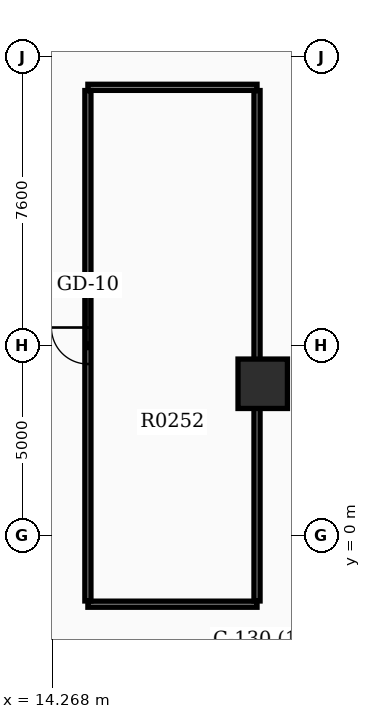
"""IFC4 building model, lengths in metres.
Left out: names, types, materials, properties, quantities, classifications, styles, units other than length and angle.
Written with IfcOpenShell. Run it as: python <this file> out.ifc"""

import sys

from ifc_helpers import new_model, si_unit, direction, frame, frame_2d, origin, origin_2d, place, context, subcontext, project, spatial, rectangle, extrude, element, fill, save


model = new_model("IFC4")
c1 = context("Model", 3, precision=1e-05, world=origin(), true_north=direction((0.0, 1.0)))
c2 = subcontext(c1, "Body", "Model", "MODEL_VIEW")
j1 = project(units=[si_unit("LENGTHUNIT", "METRE"), si_unit("PLANEANGLEUNIT", "RADIAN")], contexts=[c1])
p1 = place(None, origin())
s1 = spatial("IfcSite", under=j1, at=p1, CompositionType="ELEMENT")
p2 = place(p1, origin())
s2 = spatial("IfcBuilding", under=s1, at=p2, CompositionType="ELEMENT")
p3 = place(p2, frame((0.0, 0.0, 19.2)))
s3 = spatial("IfcBuildingStorey", under=s2, at=p3, CompositionType="ELEMENT", Elevation=19.2)
p4 = place(p3, frame((19.8, 4.0, 0.0), z_axis=(0.0, 0.0, 1.0), x_axis=(1.0, 0.0, 0.0)))
e1 = element("IfcColumn", 1, at=p4, inside=s3, PredefinedType="COLUMN", context=c2, shape_type="SweptSolid", body=[
    extrude(rectangle(XDim=1.3, YDim=1.3, at=origin_2d()), origin(), (0.0, 0.0, 1.0), 4.5),
])
for number, where, z_axis, x_axis in (
    (2, (15.2, -1.8, 0.0), (0.0, 0.0, 1.0), (1.0, 0.0, 0.0)),
    (3, (15.2, 11.8, 0.0), (0.0, 0.0, 1.0), (1.0, 0.0, 0.0)),
):
    element("IfcWall", number, at=place(p3, frame(where, z_axis=z_axis, x_axis=x_axis)), inside=s3, PredefinedType="PARTITIONING", context=c2, shape_type="SweptSolid", body=[
        extrude(rectangle(XDim=4.45, YDim=0.16, at=frame_2d((2.225, 0.0))), origin(), (0.0, 0.0, 1.0), 3.37),
    ])
p5 = place(p3, frame((15.2, -1.715, 0.0), z_axis=(0.0, 0.0, 1.0), x_axis=(0.0, 1.0, 0.0)))
e4 = element("IfcWall", 4, at=p5, inside=s3, PredefinedType="PARTITIONING", context=c2, shape_type="SweptSolid", body=[
    extrude(rectangle(XDim=13.43, YDim=0.16, at=frame_2d((6.715, 0.0))), origin(), (0.0, 0.0, 1.0), 3.37),
])
p6 = place(p5, frame((6.235, 0.0, 0.0)))
e5 = element("IfcOpeningElement", 5, at=p6, cuts=e4, PredefinedType="OPENING", context=c2, shape_type="SweptSolid", body=[
    extrude(rectangle(XDim=0.96, YDim=2.15, at=frame_2d((0.48, 1.075))), frame((0.0, 0.09, 0.0), z_axis=(0.0, -1.0, 0.0), x_axis=(1.0, 0.0, 0.0)), (0.0, 0.0, 1.0), 0.18),
])
p7 = place(p3, frame((19.65, -1.715, 0.0), z_axis=(0.0, 0.0, 1.0), x_axis=(0.0, 1.0, 0.0)))
e6 = element("IfcWall", 6, at=p7, inside=s3, PredefinedType="PARTITIONING", context=c2, shape_type="SweptSolid", body=[
    extrude(rectangle(XDim=13.43, YDim=0.16, at=frame_2d((6.715, 0.0))), origin(), (0.0, 0.0, 1.0), 3.37),
])
p8 = place(p6, origin())
e7 = element("IfcDoor", 7, at=p8, inside=s3, OperationType="SINGLE_SWING_RIGHT", PredefinedType="DOOR", context=c2, shape_type="SweptSolid", body=[
    extrude(rectangle(XDim=0.96, YDim=2.15, at=frame_2d((0.48, 1.075))), frame((0.0, 0.025, 0.0), z_axis=(0.0, -1.0, 0.0), x_axis=(1.0, 0.0, 0.0)), (0.0, 0.0, 1.0), 0.05),
])
fill(e5, e7)
save(model, sys.argv[1])
